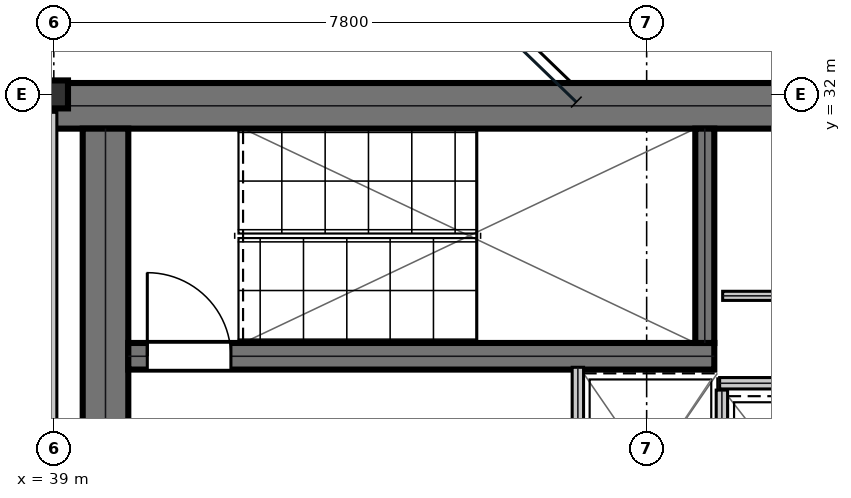
"""IFC4 building model, lengths in metres.
Left out: names, types, materials, properties, quantities, classifications, styles, units other than length and angle.
Written with IfcOpenShell. Run it as: python <this file> out.ifc"""

import sys

from ifc_helpers import new_model, si_unit, direction, frame, frame_2d, origin, origin_2d, place, context, subcontext, project, spatial, rectangle, i_section, extrude, element, fill, save


model = new_model("IFC4")
c1 = context("Model", 3, precision=1e-05, world=origin(), true_north=direction((0.0, 1.0)))
c2 = subcontext(c1, "Body", "Model", "MODEL_VIEW")
j1 = project(units=[si_unit("LENGTHUNIT", "METRE"), si_unit("PLANEANGLEUNIT", "RADIAN")], contexts=[c1])
p1 = place(None, origin())
s1 = spatial("IfcSite", under=j1, at=p1, CompositionType="ELEMENT")
p2 = place(p1, origin())
s2 = spatial("IfcBuilding", under=s1, at=p2, CompositionType="ELEMENT")
p3 = place(p2, frame((0.0, 0.0, 315.45)))
s3 = spatial("IfcBuildingStorey", under=s2, at=p3, CompositionType="ELEMENT", Elevation=315.45)
p4 = place(p3, frame((38.8, 31.85, 0.0), z_axis=(0.0, 0.0, 1.0), x_axis=(1.0, 0.0, 0.0)))
e1 = element("IfcWall", 1, at=p4, inside=s3, PredefinedType="SHEAR", context=c2, shape_type="SweptSolid", body=[
    extrude(rectangle(XDim=16.0, YDim=0.6, at=frame_2d((8.0, 0.0))), origin(), (0.0, 0.0, 1.0), 3.78),
])
p5 = place(p3, frame((39.68, 25.4, 0.0), z_axis=(0.0, 0.0, 1.0), x_axis=(0.0, 1.0, 0.0)))
e2 = element("IfcWall", 2, at=p5, inside=s3, PredefinedType="SHEAR", context=c2, shape_type="SweptSolid", body=[
    extrude(rectangle(XDim=6.15, YDim=0.6, at=frame_2d((3.075, 0.0))), origin(), (0.0, 0.0, 1.0), 3.78),
])
p6 = place(p3, frame((39.98, 28.555, 0.0), z_axis=(0.0, 0.0, 1.0), x_axis=(1.0, 0.0, 0.0)))
e3 = element("IfcWall", 3, at=p6, inside=s3, PredefinedType="SHEAR", context=c2, shape_type="SweptSolid", body=[
    extrude(rectangle(XDim=7.71, YDim=0.35, at=frame_2d((3.855, 0.0))), origin(), (0.0, 0.0, 1.0), 3.78),
])
p7 = place(p6, frame((0.25, 0.0, 0.0)))
e4 = element("IfcOpeningElement", 4, at=p7, cuts=e3, PredefinedType="OPENING", context=c2, shape_type="SweptSolid", body=[
    extrude(rectangle(XDim=1.1, YDim=2.15, at=frame_2d((0.55, 1.075))), frame((0.0, 0.185, 0.0), z_axis=(0.0, -1.0, 0.0), x_axis=(1.0, 0.0, 0.0)), (0.0, 0.0, 1.0), 0.37),
])
p8 = place(p3, frame((47.565, 28.73, 0.0), z_axis=(0.0, 0.0, 1.0), x_axis=(0.0, 1.0, 0.0)))
e5 = element("IfcWall", 5, at=p8, inside=s3, PredefinedType="SHEAR", context=c2, shape_type="SweptSolid", body=[
    extrude(rectangle(XDim=2.82, YDim=0.25, at=frame_2d((1.41, 0.0))), origin(), (0.0, 0.0, 1.0), 3.78),
])
p9 = place(p3, frame((39.0, 32.0, 0.0), z_axis=(0.0, 0.0, 1.0), x_axis=(1.0, 0.0, 0.0)))
e6 = element("IfcColumn", 6, at=p9, inside=s3, PredefinedType="COLUMN", context=c2, shape_type="SweptSolid", body=[
    extrude(i_section(OverallWidth=0.373, OverallDepth=0.368, WebThickness=0.015, FlangeThickness=0.024, at=origin_2d()), origin(), (0.0, 0.0, 1.0), 4.044),
])
p10 = place(p3, frame((45.895, 25.69, 0.0), z_axis=(0.0, 0.0, 1.0), x_axis=(0.0, 1.0, 0.0)))
e7 = element("IfcWall", 7, at=p10, inside=s3, PredefinedType="PARTITIONING", context=c2, shape_type="SweptSolid", body=[
    extrude(rectangle(XDim=2.72, YDim=0.15, at=frame_2d((1.36, 0.0))), origin(), (0.0, 0.0, 1.0), 3.78),
])
p11 = place(p10, frame((0.81, 0.0, 0.0)))
e8 = element("IfcOpeningElement", 8, at=p11, cuts=e7, PredefinedType="OPENING", context=c2, shape_type="SweptSolid", body=[
    extrude(rectangle(XDim=1.1, YDim=2.15, at=frame_2d((0.55, 1.075))), frame((0.0, 0.085, 0.0), z_axis=(0.0, -1.0, 0.0), x_axis=(1.0, 0.0, 0.0)), (0.0, 0.0, 1.0), 0.17),
])
p12 = place(p3, frame((47.79, 25.695, 0.0), z_axis=(0.0, 0.0, 1.0), x_axis=(0.0, 1.0, 0.0)))
e9 = element("IfcWall", 9, at=p12, inside=s3, PredefinedType="PARTITIONING", context=c2, shape_type="SweptSolid", body=[
    extrude(rectangle(XDim=2.415, YDim=0.15, at=frame_2d((1.208, 0.0))), origin(), (0.0, 0.0, 1.0), 3.78),
])
p13 = place(p3, frame((47.76, 28.2, 0.0), z_axis=(0.0, 0.0, 1.0), x_axis=(1.0, 0.0, 0.0)))
e10 = element("IfcWall", 10, at=p13, inside=s3, PredefinedType="PARTITIONING", context=c2, shape_type="SweptSolid", body=[
    extrude(rectangle(XDim=2.04, YDim=0.15, at=frame_2d((1.02, 0.0))), origin(), (0.0, 0.0, 1.0), 3.78),
])
p14 = place(p3, frame((47.8, 29.35, 0.0), z_axis=(0.0, 0.0, 1.0), x_axis=(1.0, 0.0, 0.0)))
e11 = element("IfcWall", 11, at=p14, inside=s3, PredefinedType="PARTITIONING", context=c2, shape_type="SweptSolid", body=[
    extrude(rectangle(XDim=5.86, YDim=0.12, at=frame_2d((2.93, 0.0))), origin(), (0.0, 0.0, 1.0), 3.78),
])
p15 = place(p14, frame((2.6, 0.0, 0.0)))
e12 = element("IfcOpeningElement", 12, at=p15, cuts=e11, PredefinedType="OPENING", context=c2, shape_type="SweptSolid", body=[
    extrude(rectangle(XDim=0.85, YDim=2.15, at=frame_2d((0.425, 1.075))), frame((0.0, 0.07, 0.0), z_axis=(0.0, -1.0, 0.0), x_axis=(1.0, 0.0, 0.0)), (0.0, 0.0, 1.0), 0.14),
])
p16 = place(p3, frame((38.95, 25.3, 0.0), z_axis=(0.0, 0.0, 1.0), x_axis=(0.0, 1.0, 0.0)))
e13 = element("IfcWall", 13, at=p16, inside=s3, PredefinedType="SOLIDWALL", context=c2, shape_type="SweptSolid", body=[
    extrude(rectangle(XDim=6.465, YDim=0.18, at=frame_2d((3.232, 0.0))), origin(), (0.0, 0.0, 1.0), 2.856),
])
p17 = place(p7, origin())
e14 = element("IfcDoor", 14, at=p17, inside=s3, OperationType="SINGLE_SWING_LEFT", PredefinedType="DOOR", context=c2, shape_type="SweptSolid", body=[
    extrude(rectangle(XDim=1.1, YDim=2.15, at=frame_2d((0.55, 1.075))), frame((0.0, 0.025, 0.0), z_axis=(0.0, -1.0, 0.0), x_axis=(1.0, 0.0, 0.0)), (0.0, 0.0, 1.0), 0.05),
])
fill(e4, e14)
save(model, sys.argv[1])
